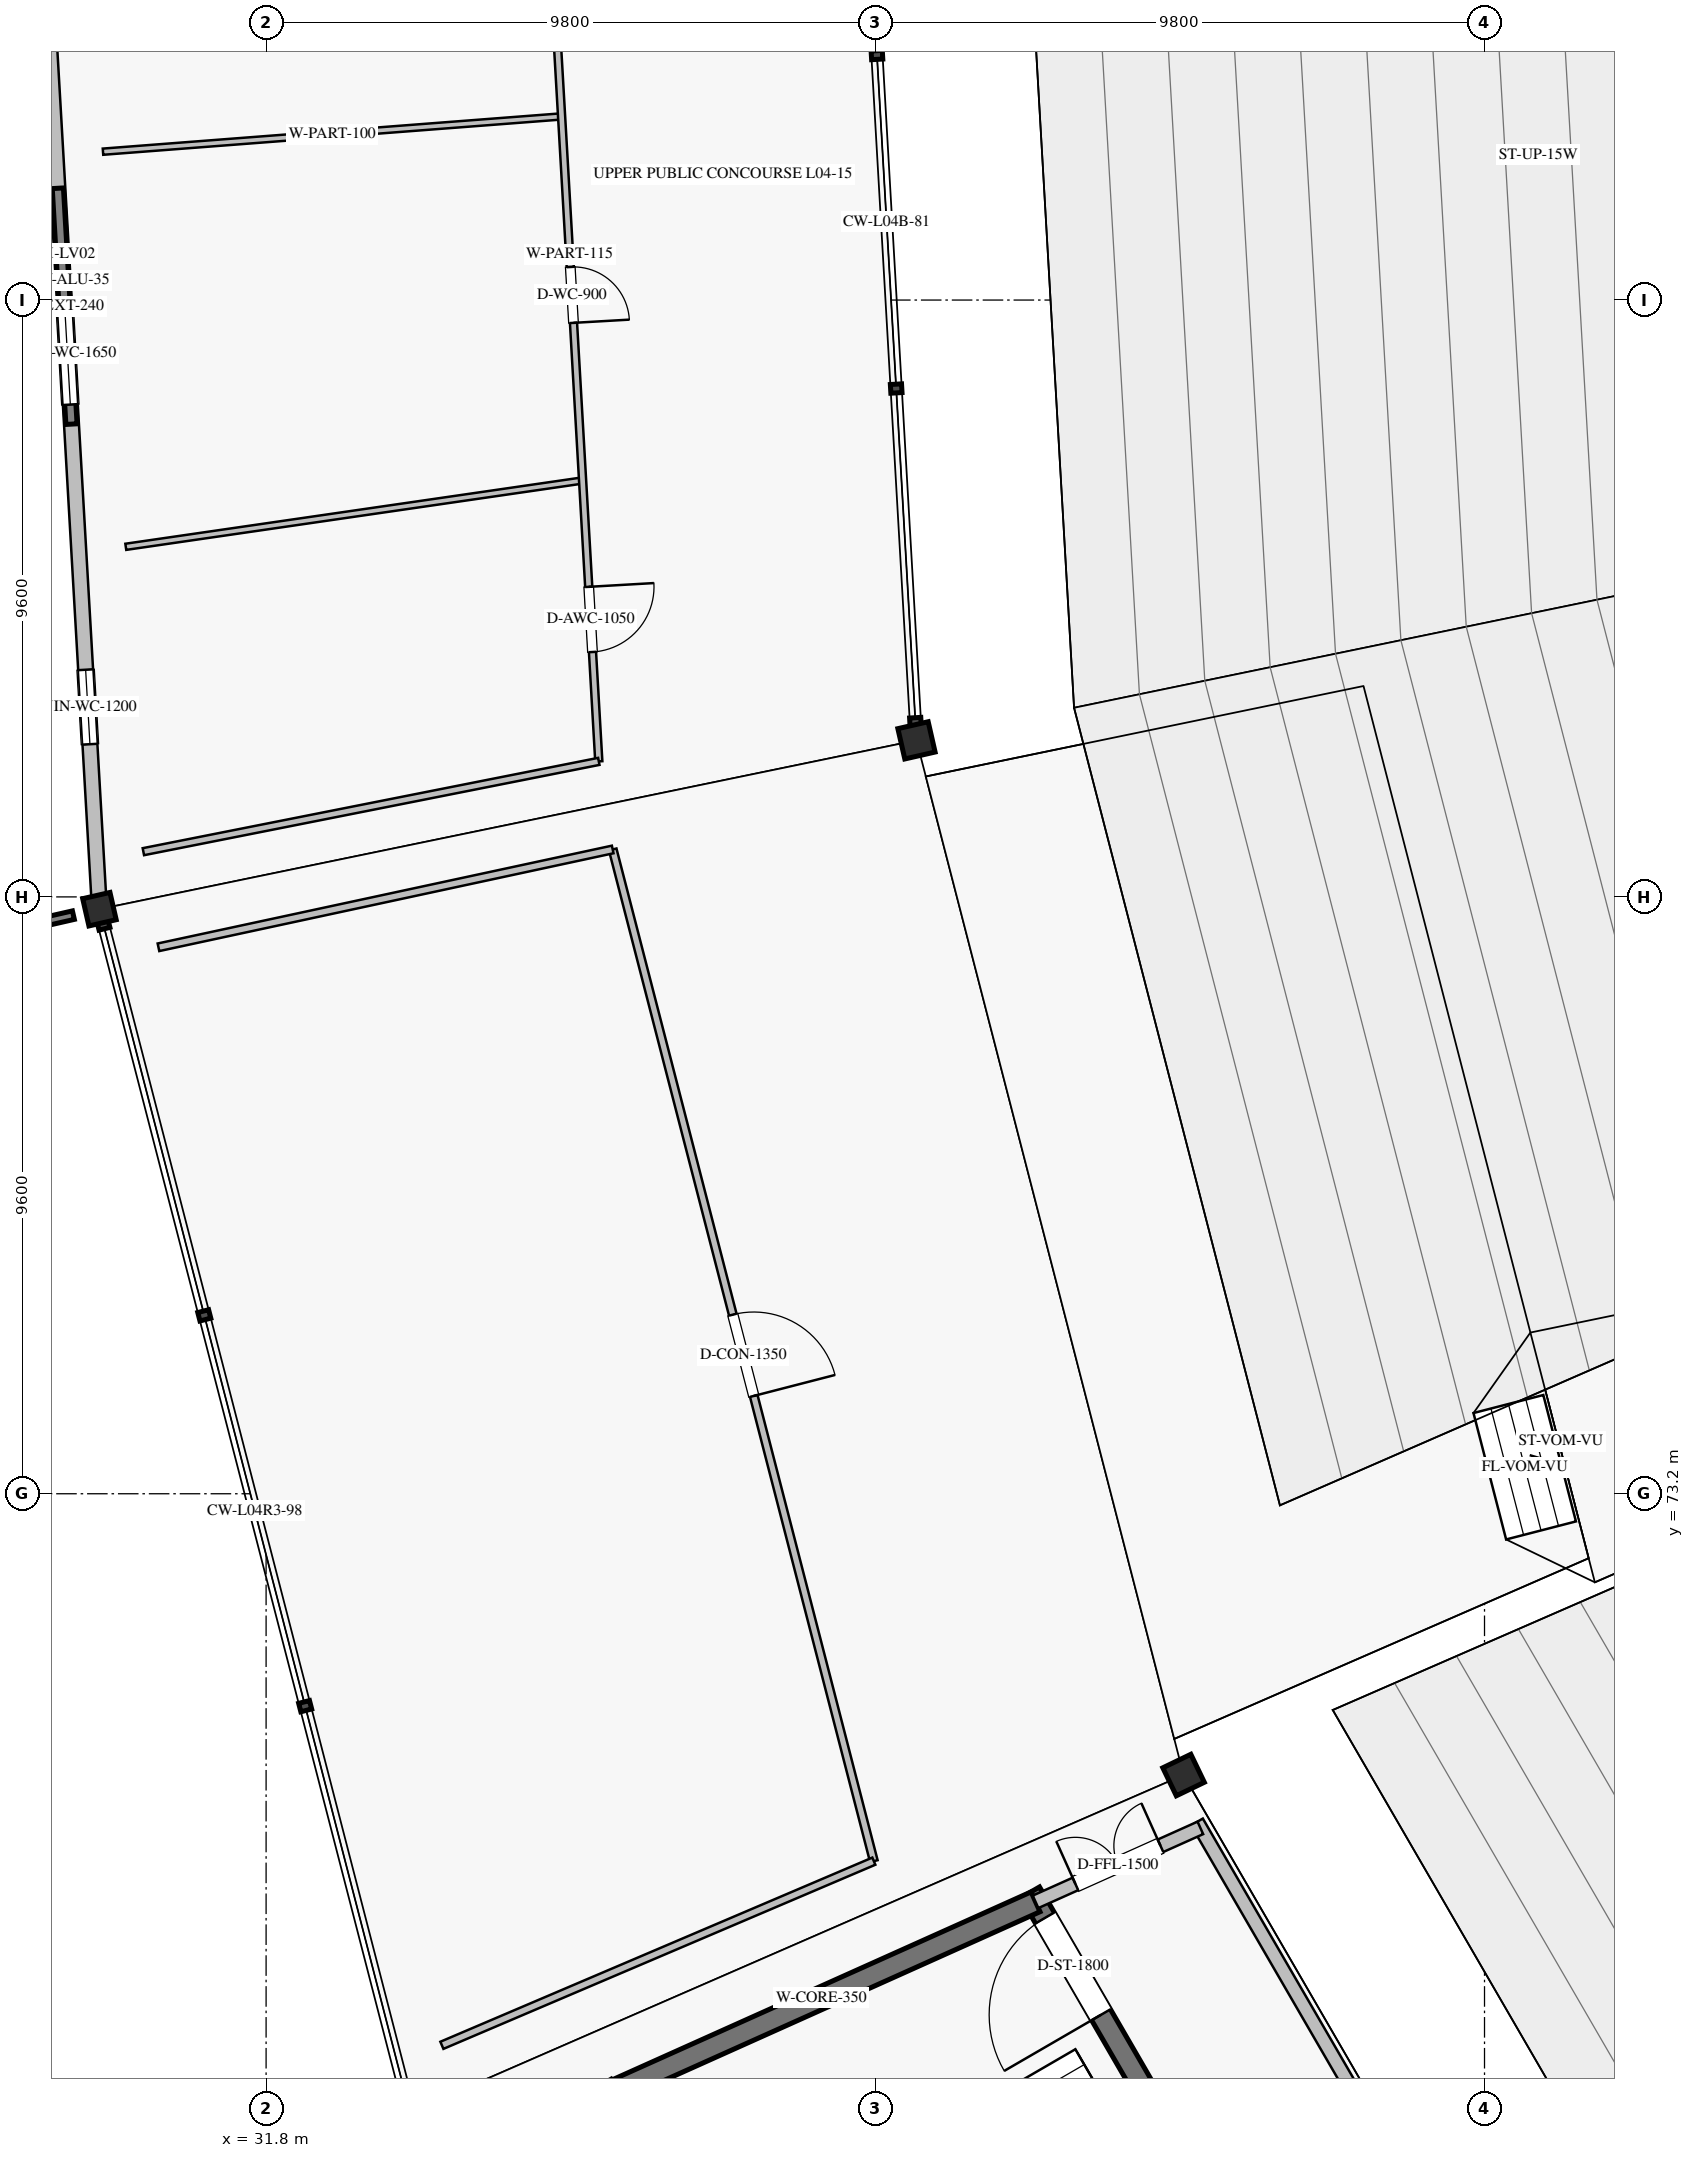
"""IFC4 building model, lengths in metres.
Left out: names, types, materials, properties, quantities, classifications, styles, units other than length and angle.
Written with IfcOpenShell. Run it as: python <this file> out.ifc"""

import sys

from ifc_helpers import new_model, si_unit, direction, frame, frame_2d, origin, origin_2d, place, context, subcontext, project, spatial, rectangle, hollow_rectangle, extrude, element, fill, save


model = new_model("IFC4")
c1 = context("Model", 3, precision=1e-05, world=origin(), true_north=direction((0.0, 1.0)))
c2 = subcontext(c1, "Body", "Model", "MODEL_VIEW")
j1 = project(units=[si_unit("LENGTHUNIT", "METRE"), si_unit("PLANEANGLEUNIT", "RADIAN")], contexts=[c1])
p1 = place(None, origin())
s1 = spatial("IfcSite", under=j1, at=p1, CompositionType="ELEMENT")
p2 = place(p1, origin())
s2 = spatial("IfcBuilding", under=s1, at=p2, CompositionType="ELEMENT")
p3 = place(p2, frame((0.0, 0.0, 20.4)))
s3 = spatial("IfcBuildingStorey", under=s2, at=p3, CompositionType="ELEMENT", Elevation=20.4)
for number, where, z_axis, x_axis in (
    (1, (42.262, 85.318, 0.0), (0.0, 0.0, 1.0), (-0.975, -0.223, 0.0)),
    (2, (46.559, 68.675, 0.0), (0.0, 0.0, 1.0), (-0.901, -0.434, 0.0)),
):
    element("IfcColumn", number, at=place(p3, frame(where, z_axis=z_axis, x_axis=x_axis)), inside=s3, PredefinedType="COLUMN", context=c2, shape_type="SweptSolid", body=[
        extrude(hollow_rectangle(XDim=0.5, YDim=0.5, WallThickness=0.022, at=origin_2d()), origin(), (0.0, 0.0, 1.0), 5.44),
    ])
p4 = place(p3, frame((29.119, 82.602, 0.0), z_axis=(0.0, 0.0, 1.0), x_axis=(-0.974927912182, -0.222520933954, 0.0)))
e3 = element("IfcColumn", 3, at=p4, inside=s3, PredefinedType="COLUMN", context=c2, shape_type="SweptSolid", body=[
    extrude(hollow_rectangle(XDim=0.45, YDim=0.45, WallThickness=0.022, at=origin_2d()), origin(), (0.0, 0.0, 1.0), 5.44),
])
p5 = place(p3, frame((28.013, 101.78, 0.0), z_axis=(0.0, 0.0, 1.0), x_axis=(0.057596781515, -0.998339927459, 0.0)))
e4 = element("IfcWall", 4, at=p5, inside=s3, PredefinedType="SOLIDWALL", context=c2, shape_type="SweptSolid", body=[
    extrude(rectangle(XDim=18.99, YDim=0.24, at=frame_2d((9.495, 0.0))), origin(), (0.0, 0.0, 1.0), 4.53),
])
p6 = place(p5, frame((3.073, 0.0, 1.65)))
e5 = element("IfcOpeningElement", 5, at=p6, cuts=e4, PredefinedType="OPENING", context=c2, shape_type="SweptSolid", body=[
    extrude(rectangle(XDim=1.45, YDim=0.95, at=frame_2d((0.725, 0.475))), frame((0.0, 0.13, 0.0), z_axis=(0.0, -1.0, 0.0), x_axis=(1.0, 0.0, 0.0)), (0.0, 0.0, 1.0), 0.26),
])
p7 = place(p5, frame((9.43, 0.0, 1.65)))
e6 = element("IfcOpeningElement", 6, at=p7, cuts=e4, PredefinedType="OPENING", context=c2, shape_type="SweptSolid", body=[
    extrude(rectangle(XDim=1.65, YDim=1.0, at=frame_2d((0.825, 0.5))), frame((0.0, 0.13, 0.0), z_axis=(0.0, -1.0, 0.0), x_axis=(1.0, 0.0, 0.0)), (0.0, 0.0, 1.0), 0.26),
])
p8 = place(p5, frame((15.352, 0.0, 1.65)))
e7 = element("IfcOpeningElement", 7, at=p8, cuts=e4, PredefinedType="OPENING", context=c2, shape_type="SweptSolid", body=[
    extrude(rectangle(XDim=1.2, YDim=0.9, at=frame_2d((0.6, 0.45))), frame((0.0, 0.13, 0.0), z_axis=(0.0, -1.0, 0.0), x_axis=(1.0, 0.0, 0.0)), (0.0, 0.0, 1.0), 0.26),
])
p9 = place(p3, frame((44.09, 66.788, 0.0), z_axis=(0.0, 0.0, 1.0), x_axis=(0.501628624814, -0.865083072755, 0.0)))
e8 = element("IfcWall", 8, at=p9, inside=s3, PredefinedType="SHEAR", context=c2, shape_type="SweptSolid", body=[
    extrude(rectangle(XDim=11.435, YDim=0.35, at=frame_2d((5.718, 0.0))), origin(), (0.0, 0.0, 1.0), 5.18),
])
p10 = place(p9, frame((0.475, 0.0, 0.0)))
e9 = element("IfcOpeningElement", 9, at=p10, cuts=e8, PredefinedType="OPENING", context=c2, shape_type="SweptSolid", body=[
    extrude(rectangle(XDim=1.8, YDim=2.2, at=frame_2d((0.9, 1.1))), frame((0.0, 0.185, 0.0), z_axis=(0.0, -1.0, 0.0), x_axis=(1.0, 0.0, 0.0)), (0.0, 0.0, 1.0), 0.37),
])
p11 = place(p3, frame((44.178, 66.636, 0.0), z_axis=(0.0, 0.0, 1.0), x_axis=(-0.912385324524, -0.409332407212, 0.0)))
e10 = element("IfcWall", 10, at=p11, inside=s3, PredefinedType="SHEAR", context=c2, shape_type="SweptSolid", body=[
    extrude(rectangle(XDim=7.554, YDim=0.35, at=frame_2d((3.777, 0.0))), origin(), (0.0, 0.0, 1.0), 5.18),
])
p12 = place(p3, frame((46.774, 67.921, 0.0), z_axis=(0.0, 0.0, 1.0), x_axis=(0.501612626242, -0.865092349518, 0.0)))
e11 = element("IfcWall", 11, at=p12, inside=s3, PredefinedType="SOLIDWALL", context=c2, shape_type="SweptSolid", body=[
    extrude(rectangle(XDim=16.11, YDim=0.22, at=frame_2d((8.055, 0.0))), origin(), (0.0, 0.0, 1.0), 5.18),
])
p13 = place(p3, frame((46.829, 67.826, 0.0), z_axis=(0.0, 0.0, 1.0), x_axis=(-0.912378422162, -0.409347791949, 0.0)))
e12 = element("IfcWall", 12, at=p13, inside=s3, PredefinedType="SOLIDWALL", context=c2, shape_type="SweptSolid", body=[
    extrude(rectangle(XDim=2.906, YDim=0.22, at=frame_2d((1.453, 0.0))), origin(), (0.0, 0.0, 1.0), 5.18),
])
p14 = place(p13, frame((0.703, 0.0, 0.0)))
e13 = element("IfcOpeningElement", 13, at=p14, cuts=e12, PredefinedType="OPENING", context=c2, shape_type="SweptSolid", body=[
    extrude(rectangle(XDim=1.5, YDim=2.2, at=frame_2d((0.75, 1.1))), frame((0.0, 0.12, 0.0), z_axis=(0.0, -1.0, 0.0), x_axis=(1.0, 0.0, 0.0)), (0.0, 0.0, 1.0), 0.24),
])
p15 = place(p3, frame((36.211, 101.291, 0.0), z_axis=(0.0, 0.0, 1.0), x_axis=(0.057605127437, -0.998339445927, 0.0)))
e14 = element("IfcWall", 14, at=p15, inside=s3, PredefinedType="PARTITIONING", context=c2, shape_type="SweptSolid", body=[
    extrude(rectangle(XDim=16.338, YDim=0.115, at=frame_2d((8.169, 0.0))), origin(), (0.0, 0.0, 1.0), 4.5),
])
p16 = place(p15, frame((2.491, 0.0, 0.0)))
e15 = element("IfcOpeningElement", 15, at=p16, cuts=e14, PredefinedType="OPENING", context=c2, shape_type="SweptSolid", body=[
    extrude(rectangle(XDim=0.9, YDim=2.1, at=frame_2d((0.45, 1.05))), frame((0.0, 0.067, 0.0), z_axis=(0.0, -1.0, 0.0), x_axis=(1.0, 0.0, 0.0)), (0.0, 0.0, 1.0), 0.135),
])
p17 = place(p15, frame((8.373, 0.0, 0.0)))
e16 = element("IfcOpeningElement", 16, at=p17, cuts=e14, PredefinedType="OPENING", context=c2, shape_type="SweptSolid", body=[
    extrude(rectangle(XDim=0.9, YDim=2.1, at=frame_2d((0.45, 1.05))), frame((0.0, 0.067, 0.0), z_axis=(0.0, -1.0, 0.0), x_axis=(1.0, 0.0, 0.0)), (0.0, 0.0, 1.0), 0.135),
])
p18 = place(p15, frame((13.526, 0.0, 0.0)))
e17 = element("IfcOpeningElement", 17, at=p18, cuts=e14, PredefinedType="OPENING", context=c2, shape_type="SweptSolid", body=[
    extrude(rectangle(XDim=1.05, YDim=2.1, at=frame_2d((0.525, 1.05))), frame((0.0, 0.067, 0.0), z_axis=(0.0, -1.0, 0.0), x_axis=(1.0, 0.0, 0.0)), (0.0, 0.0, 1.0), 0.135),
])
p19 = place(p3, frame((37.152, 84.98, 0.0), z_axis=(0.0, 0.0, 1.0), x_axis=(-0.980903700741, -0.194494035571, 0.0)))
e18 = element("IfcWall", 18, at=p19, inside=s3, PredefinedType="PARTITIONING", context=c2, shape_type="SweptSolid", body=[
    extrude(rectangle(XDim=7.469, YDim=0.115, at=frame_2d((3.734, 0.0))), origin(), (0.0, 0.0, 1.0), 4.5),
])
p20 = place(p3, frame((36.553, 95.354, 0.0), z_axis=(0.0, 0.0, 1.0), x_axis=(-0.997057978224, -0.076651079969, 0.0)))
e19 = element("IfcWall", 19, at=p20, inside=s3, PredefinedType="PARTITIONING", context=c2, shape_type="SweptSolid", body=[
    extrude(rectangle(XDim=7.399, YDim=0.1, at=frame_2d((3.699, 0.0))), origin(), (0.0, 0.0, 1.0), 4.5),
])
p21 = place(p3, frame((36.891, 89.498, 0.0), z_axis=(0.0, 0.0, 1.0), x_axis=(-0.989624042241, -0.143681087896, 0.0)))
e20 = element("IfcWall", 20, at=p21, inside=s3, PredefinedType="PARTITIONING", context=c2, shape_type="SweptSolid", body=[
    extrude(rectangle(XDim=7.426, YDim=0.1, at=frame_2d((3.713, 0.0))), origin(), (0.0, 0.0, 1.0), 4.5),
])
p22 = place(p3, frame((37.375, 83.563, 0.0), z_axis=(0.0, 0.0, 1.0), x_axis=(0.249966328054, -0.968254529986, 0.0)))
e21 = element("IfcWall", 21, at=p22, inside=s3, PredefinedType="PARTITIONING", context=c2, shape_type="SweptSolid", body=[
    extrude(rectangle(XDim=16.806, YDim=0.125, at=frame_2d((8.403, 0.0))), origin(), (0.0, 0.0, 1.0), 4.5),
])
p23 = place(p22, frame((7.728, 0.0, 0.0)))
e22 = element("IfcOpeningElement", 22, at=p23, cuts=e21, PredefinedType="OPENING", context=c2, shape_type="SweptSolid", body=[
    extrude(rectangle(XDim=1.35, YDim=2.15, at=frame_2d((0.675, 1.075))), frame((0.0, 0.073, 0.0), z_axis=(0.0, -1.0, 0.0), x_axis=(1.0, 0.0, 0.0)), (0.0, 0.0, 1.0), 0.145),
])
p24 = place(p3, frame((37.375, 83.563, 0.0), z_axis=(0.0, 0.0, 1.0), x_axis=(-0.977591606225, -0.210510454464, 0.0)))
e23 = element("IfcWall", 23, at=p24, inside=s3, PredefinedType="PARTITIONING", context=c2, shape_type="SweptSolid", body=[
    extrude(rectangle(XDim=7.475, YDim=0.125, at=frame_2d((3.737, 0.0))), origin(), (0.0, 0.0, 1.0), 4.5),
])
p25 = place(p3, frame((41.576, 67.291, 0.0), z_axis=(0.0, 0.0, 1.0), x_axis=(-0.919898990597, -0.39215538642, 0.0)))
e24 = element("IfcWall", 24, at=p25, inside=s3, PredefinedType="PARTITIONING", context=c2, shape_type="SweptSolid", body=[
    extrude(rectangle(XDim=7.553, YDim=0.125, at=frame_2d((3.777, 0.0))), origin(), (0.0, 0.0, 1.0), 4.5),
])
p26 = place(p7, origin())
e25 = element("IfcWindow", 25, at=p26, inside=s3, PartitioningType="SINGLE_PANEL", PredefinedType="WINDOW", context=c2, shape_type="SweptSolid", body=[
    extrude(rectangle(XDim=1.65, YDim=1.0, at=frame_2d((0.825, 0.5))), frame((0.0, 0.03, 0.0), z_axis=(0.0, -1.0, 0.0), x_axis=(1.0, 0.0, 0.0)), (0.0, 0.0, 1.0), 0.06),
])
fill(e6, e25)
p27 = place(p8, origin())
e26 = element("IfcWindow", 26, at=p27, inside=s3, PartitioningType="SINGLE_PANEL", PredefinedType="WINDOW", context=c2, shape_type="SweptSolid", body=[
    extrude(rectangle(XDim=1.2, YDim=0.9, at=frame_2d((0.6, 0.45))), frame((0.0, 0.03, 0.0), z_axis=(0.0, -1.0, 0.0), x_axis=(1.0, 0.0, 0.0)), (0.0, 0.0, 1.0), 0.06),
])
fill(e7, e26)
p28 = place(p10, frame((1.8, 0.0, 0.0), z_axis=(0.0, 0.0, 1.0), x_axis=(-1.0, 0.0, 0.0)))
e27 = element("IfcDoor", 27, at=p28, inside=s3, OperationType="SINGLE_SWING_LEFT", PredefinedType="DOOR", context=c2, shape_type="SweptSolid", body=[
    extrude(rectangle(XDim=1.8, YDim=2.2, at=frame_2d((0.9, 1.1))), frame((0.0, 0.025, 0.0), z_axis=(0.0, -1.0, 0.0), x_axis=(1.0, 0.0, 0.0)), (0.0, 0.0, 1.0), 0.05),
])
fill(e9, e27)
p29 = place(p14, frame((1.5, 0.0, 0.0), z_axis=(0.0, 0.0, 1.0), x_axis=(-1.0, 0.0, 0.0)))
e28 = element("IfcDoor", 28, at=p29, inside=s3, OperationType="DOUBLE_DOOR_SINGLE_SWING", PredefinedType="DOOR", context=c2, shape_type="SweptSolid", body=[
    extrude(rectangle(XDim=1.5, YDim=2.2, at=frame_2d((0.75, 1.1))), frame((0.0, 0.025, 0.0), z_axis=(0.0, -1.0, 0.0), x_axis=(1.0, 0.0, 0.0)), (0.0, 0.0, 1.0), 0.05),
])
fill(e13, e28)
p30 = place(p17, origin())
e29 = element("IfcDoor", 29, at=p30, inside=s3, OperationType="SINGLE_SWING_RIGHT", PredefinedType="DOOR", context=c2, shape_type="SweptSolid", body=[
    extrude(rectangle(XDim=0.9, YDim=2.1, at=frame_2d((0.45, 1.05))), frame((0.0, 0.025, 0.0), z_axis=(0.0, -1.0, 0.0), x_axis=(1.0, 0.0, 0.0)), (0.0, 0.0, 1.0), 0.05),
])
fill(e16, e29)
p31 = place(p18, origin())
e30 = element("IfcDoor", 30, at=p31, inside=s3, OperationType="SINGLE_SWING_LEFT", PredefinedType="DOOR", context=c2, shape_type="SweptSolid", body=[
    extrude(rectangle(XDim=1.05, YDim=2.1, at=frame_2d((0.525, 1.05))), frame((0.0, 0.025, 0.0), z_axis=(0.0, -1.0, 0.0), x_axis=(1.0, 0.0, 0.0)), (0.0, 0.0, 1.0), 0.05),
])
fill(e17, e30)
p32 = place(p23, origin())
e31 = element("IfcDoor", 31, at=p32, inside=s3, OperationType="SINGLE_SWING_RIGHT", PredefinedType="DOOR", context=c2, shape_type="SweptSolid", body=[
    extrude(rectangle(XDim=1.35, YDim=2.15, at=frame_2d((0.675, 1.075))), frame((0.0, 0.025, 0.0), z_axis=(0.0, -1.0, 0.0), x_axis=(1.0, 0.0, 0.0)), (0.0, 0.0, 1.0), 0.05),
])
fill(e22, e31)
save(model, sys.argv[1])
